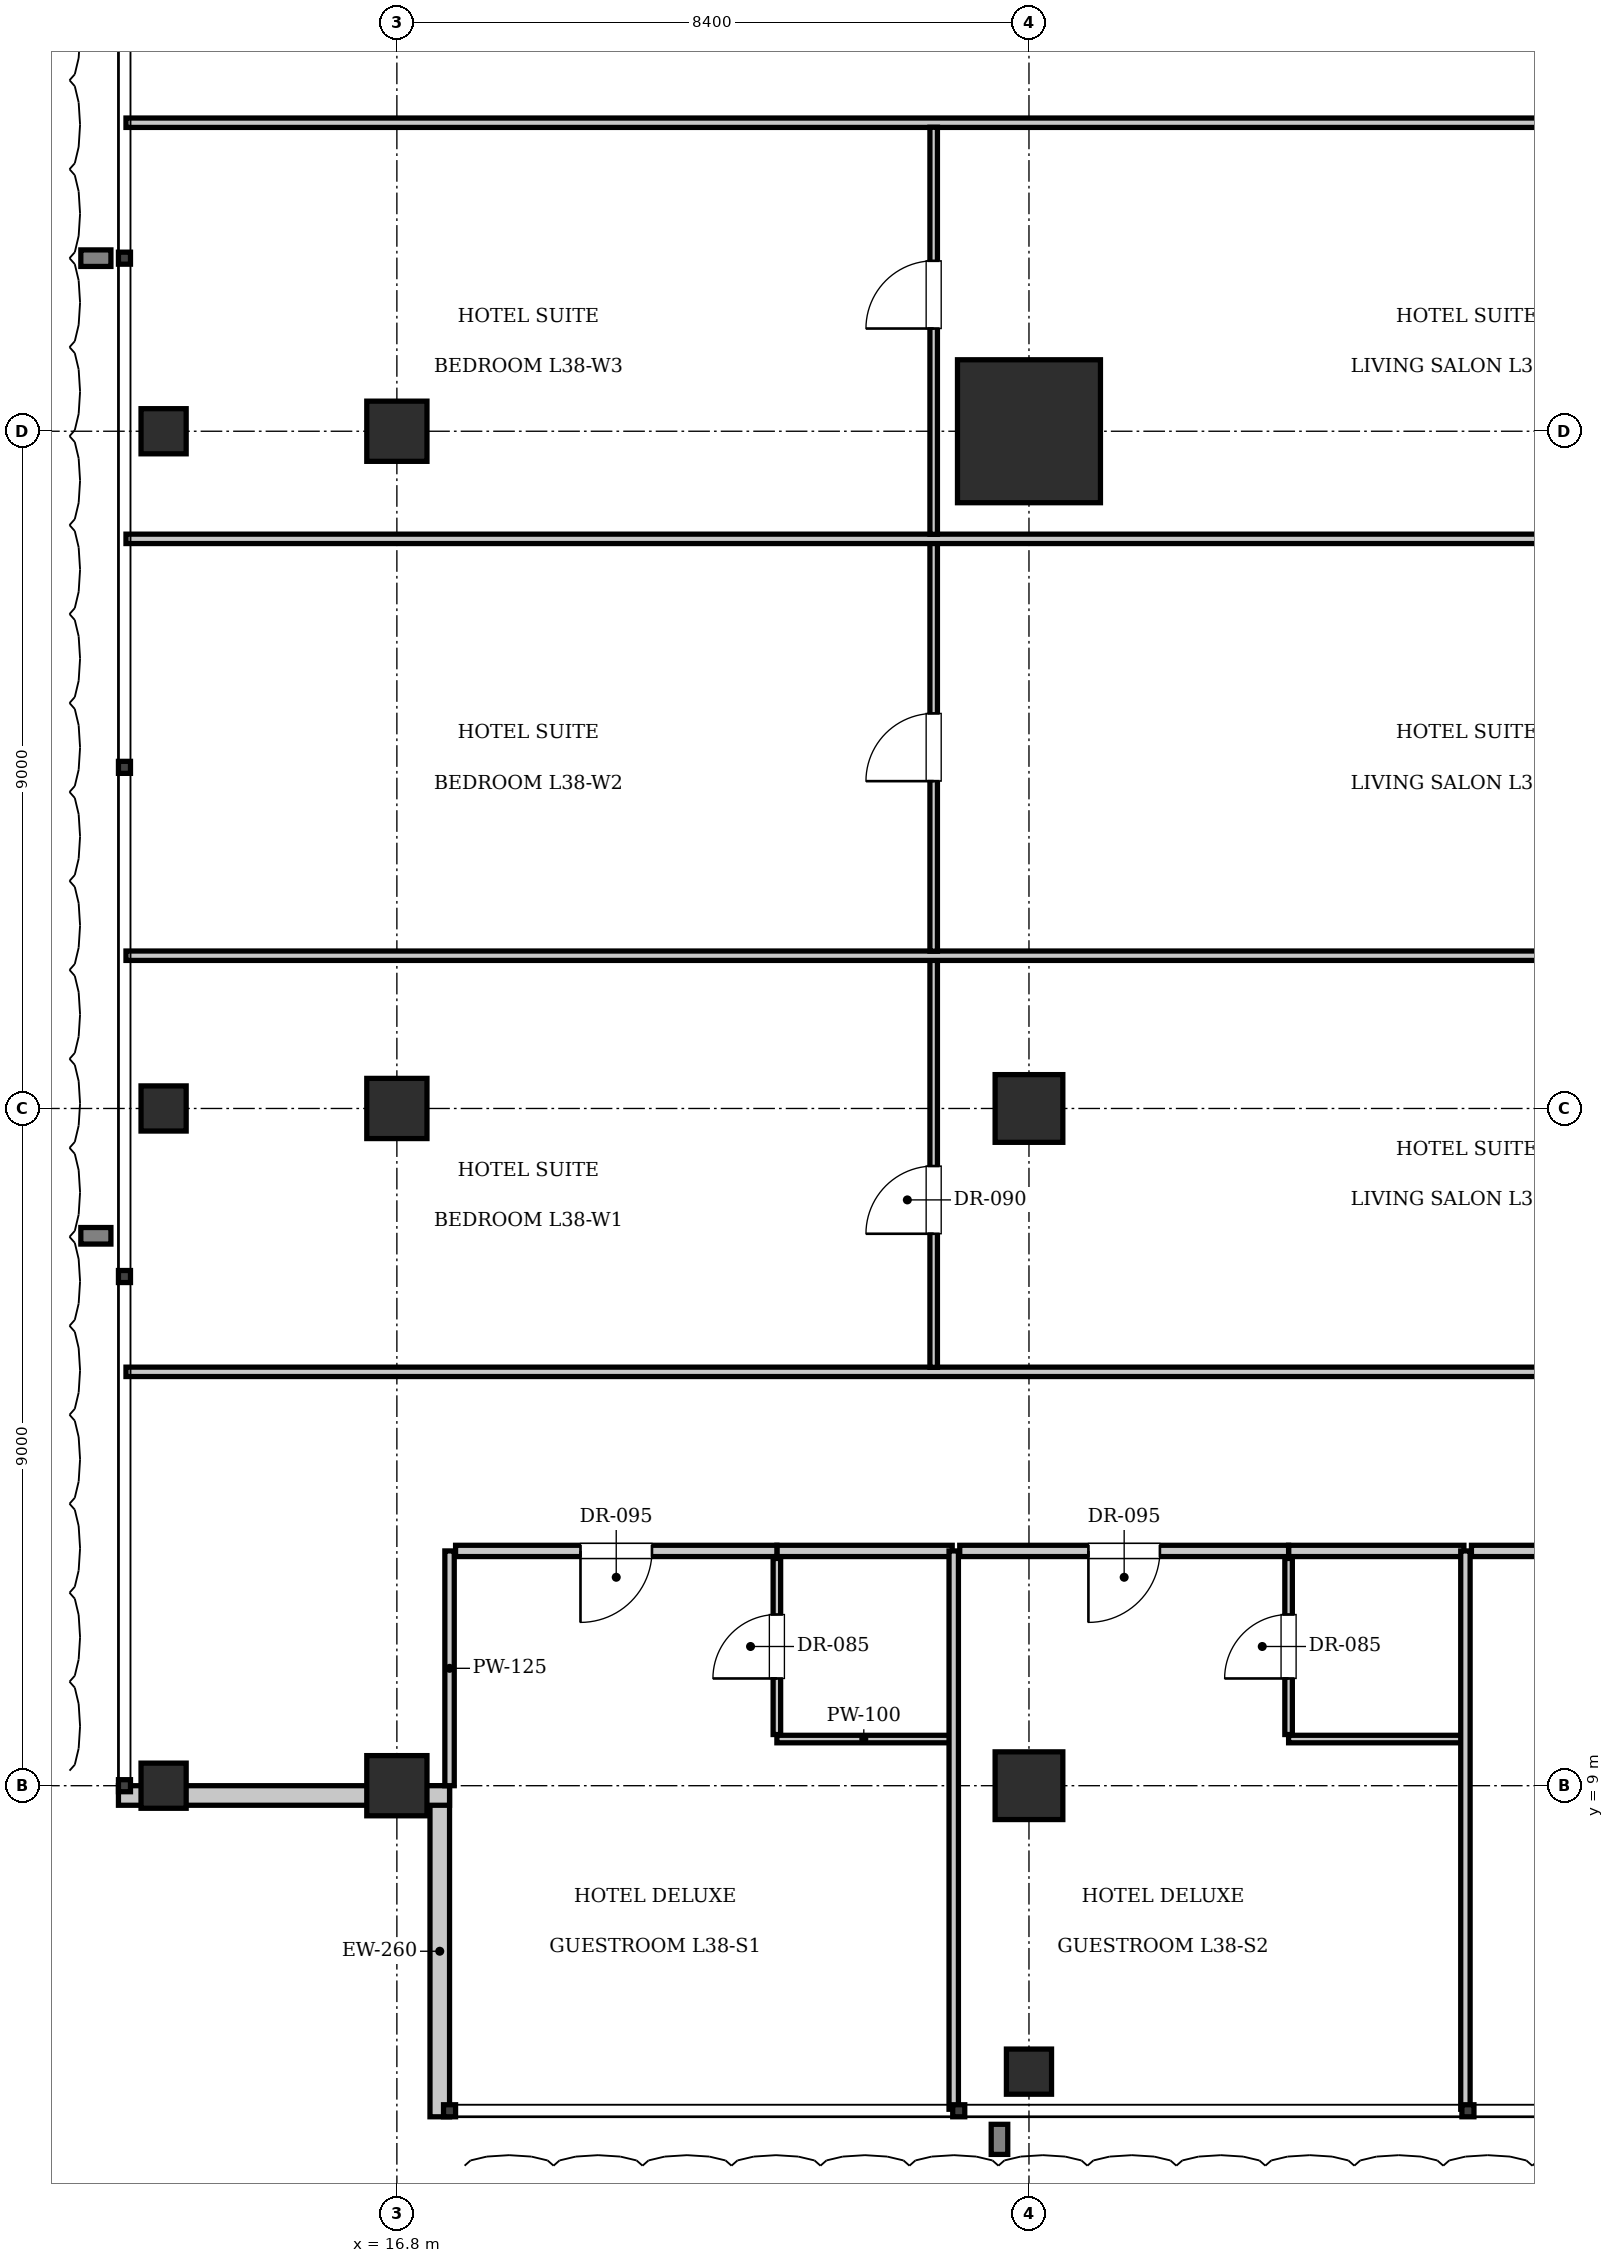
"""IFC4 building model, lengths in metres.
Left out: names, types, materials, properties, quantities, classifications, styles, units other than length and angle.
Written with IfcOpenShell. Run it as: python <this file> out.ifc"""

import sys

from ifc_helpers import new_model, si_unit, direction, frame, frame_2d, origin, origin_2d, place, context, subcontext, project, spatial, rectangle, i_section, extrude, element, fill, save


model = new_model("IFC4")
c1 = context("Model", 3, precision=1e-05, world=origin(), true_north=direction((0.0, 1.0)))
c2 = subcontext(c1, "Body", "Model", "MODEL_VIEW")
j1 = project(units=[si_unit("LENGTHUNIT", "METRE"), si_unit("PLANEANGLEUNIT", "RADIAN")], contexts=[c1])
p1 = place(None, origin())
s1 = spatial("IfcSite", under=j1, at=p1, CompositionType="ELEMENT")
p2 = place(p1, origin())
s2 = spatial("IfcBuilding", under=s1, at=p2, CompositionType="ELEMENT")
p3 = place(p2, frame((0.0, 0.0, 158.2)))
s3 = spatial("IfcBuildingStorey", under=s2, at=p3, CompositionType="ELEMENT", Elevation=158.2)
p4 = place(p3, frame((25.2, 27.0, 0.0), z_axis=(0.0, 0.0, 1.0), x_axis=(1.0, 0.0, 0.0)))
e1 = element("IfcColumn", 1, at=p4, inside=s3, PredefinedType="COLUMN", context=c2, shape_type="SweptSolid", body=[
    extrude(rectangle(XDim=1.9, YDim=1.9, at=origin_2d()), origin(), (0.0, 0.0, 1.0), 3.85),
])
for number, where, z_axis, x_axis in (
    (2, (25.2, 18.0, 0.0), (0.0, 0.0, 1.0), (1.0, 0.0, 0.0)),
    (3, (25.2, 9.0, 0.0), (0.0, 0.0, 1.0), (1.0, 0.0, 0.0)),
):
    element("IfcColumn", number, at=place(p3, frame(where, z_axis=z_axis, x_axis=x_axis)), inside=s3, PredefinedType="COLUMN", context=c2, shape_type="SweptSolid", body=[
        extrude(rectangle(XDim=0.9, YDim=0.9, at=origin_2d()), origin(), (0.0, 0.0, 1.0), 3.85),
    ])
for number, where, z_axis, x_axis in (
    (4, (16.8, 9.0, 0.0), (0.0, 0.0, 1.0), (1.0, 0.0, 0.0)),
    (5, (16.8, 18.0, 0.0), (0.0, 0.0, 1.0), (1.0, 0.0, 0.0)),
    (6, (16.8, 27.0, 0.0), (0.0, 0.0, 1.0), (1.0, 0.0, 0.0)),
):
    element("IfcColumn", number, at=place(p3, frame(where, z_axis=z_axis, x_axis=x_axis)), inside=s3, PredefinedType="COLUMN", context=c2, shape_type="SweptSolid", body=[
        extrude(rectangle(XDim=0.8, YDim=0.8, at=origin_2d()), origin(), (0.0, 0.0, 1.0), 3.85),
    ])
for number, where, z_axis, x_axis in (
    (7, (13.7, 9.0, 0.0), (0.0, 0.0, 1.0), (1.0, 0.0, 0.0)),
    (8, (13.7, 18.0, 0.0), (0.0, 0.0, 1.0), (1.0, 0.0, 0.0)),
    (9, (13.7, 27.0, 0.0), (0.0, 0.0, 1.0), (1.0, 0.0, 0.0)),
    (10, (25.2, 5.2, 0.0), (0.0, 0.0, 1.0), (1.0, 0.0, 0.0)),
):
    element("IfcColumn", number, at=place(p3, frame(where, z_axis=z_axis, x_axis=x_axis)), inside=s3, PredefinedType="COLUMN", context=c2, shape_type="SweptSolid", body=[
        extrude(i_section(OverallWidth=0.6, OverallDepth=0.6, WebThickness=0.025, FlangeThickness=0.038, at=origin_2d()), origin(), (0.0, 0.0, 1.0), 3.85),
    ])
p5 = place(p3, frame((17.37, 4.6, 0.0), z_axis=(0.0, 0.0, 1.0), x_axis=(0.0, 1.0, 0.0)))
e11 = element("IfcWall", 11, at=p5, inside=s3, PredefinedType="SOLIDWALL", context=c2, shape_type="SweptSolid", body=[
    extrude(rectangle(XDim=4.4, YDim=0.26, at=frame_2d((2.2, 0.0))), origin(), (0.0, 0.0, 1.0), 3.61),
])
p6 = place(p3, frame((17.5, 8.87, 0.0), z_axis=(0.0, 0.0, 1.0), x_axis=(-1.0, 0.0, 0.0)))
e12 = element("IfcWall", 12, at=p6, inside=s3, PredefinedType="SOLIDWALL", context=c2, shape_type="SweptSolid", body=[
    extrude(rectangle(XDim=4.4, YDim=0.26, at=frame_2d((2.2, 0.0))), origin(), (0.0, 0.0, 1.0), 3.007),
])
p7 = place(p3, frame((17.5, 9.0, 0.0), z_axis=(0.0, 0.0, 1.0), x_axis=(0.0, 1.0, 0.0)))
e13 = element("IfcWall", 13, at=p7, inside=s3, PredefinedType="PARTITIONING", context=c2, shape_type="SweptSolid", body=[
    extrude(rectangle(XDim=3.12, YDim=0.125, at=frame_2d((1.56, 0.0))), origin(), (0.0, 0.0, 1.0), 3.61),
])
p8 = place(p3, frame((21.85, 12.12, 0.0), z_axis=(0.0, 0.0, 1.0), x_axis=(1.0, 0.0, 0.0)))
e14 = element("IfcWall", 14, at=p8, inside=s3, PredefinedType="PARTITIONING", context=c2, shape_type="SweptSolid", body=[
    extrude(rectangle(XDim=2.33, YDim=0.15, at=frame_2d((1.165, 0.0))), origin(), (0.0, 0.0, 1.0), 3.61),
])
p9 = place(p3, frame((21.85, 9.62, 0.0), z_axis=(0.0, 0.0, 1.0), x_axis=(1.0, 0.0, 0.0)))
e15 = element("IfcWall", 15, at=p9, inside=s3, PredefinedType="PARTITIONING", context=c2, shape_type="SweptSolid", body=[
    extrude(rectangle(XDim=2.31, YDim=0.1, at=frame_2d((1.155, 0.0))), origin(), (0.0, 0.0, 1.0), 3.61),
])
p10 = place(p3, frame((21.85, 9.68, 0.0), z_axis=(0.0, 0.0, 1.0), x_axis=(0.0, 1.0, 0.0)))
e16 = element("IfcWall", 16, at=p10, inside=s3, PredefinedType="PARTITIONING", context=c2, shape_type="SweptSolid", body=[
    extrude(rectangle(XDim=2.34, YDim=0.1, at=frame_2d((1.17, 0.0))), origin(), (0.0, 0.0, 1.0), 3.61),
])
p11 = place(p10, frame((0.745, 0.0, 0.0)))
e17 = element("IfcOpeningElement", 17, at=p11, cuts=e16, PredefinedType="OPENING", context=c2, shape_type="SweptSolid", body=[
    extrude(rectangle(XDim=0.85, YDim=2.1, at=frame_2d((0.425, 1.05))), frame((0.0, 0.06, 0.0), z_axis=(0.0, -1.0, 0.0), x_axis=(1.0, 0.0, 0.0)), (0.0, 0.0, 1.0), 0.12),
])
p12 = place(p3, frame((17.58, 12.12, 0.0), z_axis=(0.0, 0.0, 1.0), x_axis=(1.0, 0.0, 0.0)))
e18 = element("IfcWall", 18, at=p12, inside=s3, PredefinedType="PARTITIONING", context=c2, shape_type="SweptSolid", body=[
    extrude(rectangle(XDim=4.27, YDim=0.15, at=frame_2d((2.135, 0.0))), origin(), (0.0, 0.0, 1.0), 3.61),
])
p13 = place(p12, frame((1.66, 0.0, 0.0)))
e19 = element("IfcOpeningElement", 19, at=p13, cuts=e18, PredefinedType="OPENING", context=c2, shape_type="SweptSolid", body=[
    extrude(rectangle(XDim=0.95, YDim=2.15, at=frame_2d((0.475, 1.075))), frame((0.0, 0.085, 0.0), z_axis=(0.0, -1.0, 0.0), x_axis=(1.0, 0.0, 0.0)), (0.0, 0.0, 1.0), 0.17),
])
p14 = place(p3, frame((24.2, 4.7, 0.0), z_axis=(0.0, 0.0, 1.0), x_axis=(0.0, 1.0, 0.0)))
e20 = element("IfcWall", 20, at=p14, inside=s3, PredefinedType="PARTITIONING", context=c2, shape_type="SweptSolid", body=[
    extrude(rectangle(XDim=7.42, YDim=0.125, at=frame_2d((3.71, 0.0))), origin(), (0.0, 0.0, 1.0), 3.61),
])
p15 = place(p3, frame((28.65, 12.12, 0.0), z_axis=(0.0, 0.0, 1.0), x_axis=(1.0, 0.0, 0.0)))
e21 = element("IfcWall", 21, at=p15, inside=s3, PredefinedType="PARTITIONING", context=c2, shape_type="SweptSolid", body=[
    extrude(rectangle(XDim=2.33, YDim=0.15, at=frame_2d((1.165, 0.0))), origin(), (0.0, 0.0, 1.0), 3.61),
])
p16 = place(p3, frame((28.65, 9.62, 0.0), z_axis=(0.0, 0.0, 1.0), x_axis=(1.0, 0.0, 0.0)))
e22 = element("IfcWall", 22, at=p16, inside=s3, PredefinedType="PARTITIONING", context=c2, shape_type="SweptSolid", body=[
    extrude(rectangle(XDim=2.31, YDim=0.1, at=frame_2d((1.155, 0.0))), origin(), (0.0, 0.0, 1.0), 3.61),
])
p17 = place(p3, frame((28.65, 9.68, 0.0), z_axis=(0.0, 0.0, 1.0), x_axis=(0.0, 1.0, 0.0)))
e23 = element("IfcWall", 23, at=p17, inside=s3, PredefinedType="PARTITIONING", context=c2, shape_type="SweptSolid", body=[
    extrude(rectangle(XDim=2.34, YDim=0.1, at=frame_2d((1.17, 0.0))), origin(), (0.0, 0.0, 1.0), 3.61),
])
p18 = place(p17, frame((0.745, 0.0, 0.0)))
e24 = element("IfcOpeningElement", 24, at=p18, cuts=e23, PredefinedType="OPENING", context=c2, shape_type="SweptSolid", body=[
    extrude(rectangle(XDim=0.85, YDim=2.1, at=frame_2d((0.425, 1.05))), frame((0.0, 0.06, 0.0), z_axis=(0.0, -1.0, 0.0), x_axis=(1.0, 0.0, 0.0)), (0.0, 0.0, 1.0), 0.12),
])
p19 = place(p3, frame((24.28, 12.12, 0.0), z_axis=(0.0, 0.0, 1.0), x_axis=(1.0, 0.0, 0.0)))
e25 = element("IfcWall", 25, at=p19, inside=s3, PredefinedType="PARTITIONING", context=c2, shape_type="SweptSolid", body=[
    extrude(rectangle(XDim=4.37, YDim=0.15, at=frame_2d((2.185, 0.0))), origin(), (0.0, 0.0, 1.0), 3.61),
])
p20 = place(p19, frame((1.71, 0.0, 0.0)))
e26 = element("IfcOpeningElement", 26, at=p20, cuts=e25, PredefinedType="OPENING", context=c2, shape_type="SweptSolid", body=[
    extrude(rectangle(XDim=0.95, YDim=2.15, at=frame_2d((0.475, 1.075))), frame((0.0, 0.085, 0.0), z_axis=(0.0, -1.0, 0.0), x_axis=(1.0, 0.0, 0.0)), (0.0, 0.0, 1.0), 0.17),
])
p21 = place(p3, frame((31.0, 4.7, 0.0), z_axis=(0.0, 0.0, 1.0), x_axis=(0.0, 1.0, 0.0)))
e27 = element("IfcWall", 27, at=p21, inside=s3, PredefinedType="PARTITIONING", context=c2, shape_type="SweptSolid", body=[
    extrude(rectangle(XDim=7.42, YDim=0.125, at=frame_2d((3.71, 0.0))), origin(), (0.0, 0.0, 1.0), 3.61),
])
p22 = place(p3, frame((31.08, 12.12, 0.0), z_axis=(0.0, 0.0, 1.0), x_axis=(1.0, 0.0, 0.0)))
e28 = element("IfcWall", 28, at=p22, inside=s3, PredefinedType="PARTITIONING", context=c2, shape_type="SweptSolid", body=[
    extrude(rectangle(XDim=4.37, YDim=0.15, at=frame_2d((2.185, 0.0))), origin(), (0.0, 0.0, 1.0), 3.61),
])
p23 = place(p22, frame((1.71, 0.0, 0.0)))
e29 = element("IfcOpeningElement", 29, at=p23, cuts=e28, PredefinedType="OPENING", context=c2, shape_type="SweptSolid", body=[
    extrude(rectangle(XDim=0.95, YDim=2.15, at=frame_2d((0.475, 1.075))), frame((0.0, 0.085, 0.0), z_axis=(0.0, -1.0, 0.0), x_axis=(1.0, 0.0, 0.0)), (0.0, 0.0, 1.0), 0.17),
])
for number, where, z_axis, x_axis in (
    (30, (13.2, 14.5, 0.0), (0.0, 0.0, 1.0), (1.0, 0.0, 0.0)),
    (31, (13.2, 31.1, 0.0), (0.0, 0.0, 1.0), (1.0, 0.0, 0.0)),
):
    element("IfcWall", number, at=place(p3, frame(where, z_axis=z_axis, x_axis=x_axis)), inside=s3, PredefinedType="PARTITIONING", context=c2, shape_type="SweptSolid", body=[
        extrude(rectangle(XDim=24.92, YDim=0.125, at=frame_2d((12.46, 0.0))), origin(), (0.0, 0.0, 1.0), 3.61),
    ])
p24 = place(p3, frame((23.934, 14.56, 0.0), z_axis=(0.0, 0.0, 1.0), x_axis=(0.0, 1.0, 0.0)))
e32 = element("IfcWall", 32, at=p24, inside=s3, PredefinedType="PARTITIONING", context=c2, shape_type="SweptSolid", body=[
    extrude(rectangle(XDim=5.41, YDim=0.1, at=frame_2d((2.705, 0.0))), origin(), (0.0, 0.0, 1.0), 3.61),
])
p25 = place(p24, frame((1.775, 0.0, 0.0)))
e33 = element("IfcOpeningElement", 33, at=p25, cuts=e32, PredefinedType="OPENING", context=c2, shape_type="SweptSolid", body=[
    extrude(rectangle(XDim=0.9, YDim=2.1, at=frame_2d((0.45, 1.05))), frame((0.0, 0.06, 0.0), z_axis=(0.0, -1.0, 0.0), x_axis=(1.0, 0.0, 0.0)), (0.0, 0.0, 1.0), 0.12),
])
p26 = place(p3, frame((13.2, 20.03, 0.0), z_axis=(0.0, 0.0, 1.0), x_axis=(1.0, 0.0, 0.0)))
e34 = element("IfcWall", 34, at=p26, inside=s3, PredefinedType="PARTITIONING", context=c2, shape_type="SweptSolid", body=[
    extrude(rectangle(XDim=24.92, YDim=0.125, at=frame_2d((12.46, 0.0))), origin(), (0.0, 0.0, 1.0), 3.61),
])
p27 = place(p3, frame((23.934, 20.09, 0.0), z_axis=(0.0, 0.0, 1.0), x_axis=(0.0, 1.0, 0.0)))
e35 = element("IfcWall", 35, at=p27, inside=s3, PredefinedType="PARTITIONING", context=c2, shape_type="SweptSolid", body=[
    extrude(rectangle(XDim=5.42, YDim=0.1, at=frame_2d((2.71, 0.0))), origin(), (0.0, 0.0, 1.0), 3.61),
])
p28 = place(p27, frame((2.26, 0.0, 0.0)))
e36 = element("IfcOpeningElement", 36, at=p28, cuts=e35, PredefinedType="OPENING", context=c2, shape_type="SweptSolid", body=[
    extrude(rectangle(XDim=0.9, YDim=2.1, at=frame_2d((0.45, 1.05))), frame((0.0, 0.06, 0.0), z_axis=(0.0, -1.0, 0.0), x_axis=(1.0, 0.0, 0.0)), (0.0, 0.0, 1.0), 0.12),
])
p29 = place(p3, frame((13.2, 25.57, 0.0), z_axis=(0.0, 0.0, 1.0), x_axis=(1.0, 0.0, 0.0)))
e37 = element("IfcWall", 37, at=p29, inside=s3, PredefinedType="PARTITIONING", context=c2, shape_type="SweptSolid", body=[
    extrude(rectangle(XDim=24.92, YDim=0.125, at=frame_2d((12.46, 0.0))), origin(), (0.0, 0.0, 1.0), 3.61),
])
p30 = place(p3, frame((23.934, 25.63, 0.0), z_axis=(0.0, 0.0, 1.0), x_axis=(0.0, 1.0, 0.0)))
e38 = element("IfcWall", 38, at=p30, inside=s3, PredefinedType="PARTITIONING", context=c2, shape_type="SweptSolid", body=[
    extrude(rectangle(XDim=5.41, YDim=0.1, at=frame_2d((2.705, 0.0))), origin(), (0.0, 0.0, 1.0), 3.61),
])
p31 = place(p30, frame((2.735, 0.0, 0.0)))
e39 = element("IfcOpeningElement", 39, at=p31, cuts=e38, PredefinedType="OPENING", context=c2, shape_type="SweptSolid", body=[
    extrude(rectangle(XDim=0.9, YDim=2.1, at=frame_2d((0.45, 1.05))), frame((0.0, 0.06, 0.0), z_axis=(0.0, -1.0, 0.0), x_axis=(1.0, 0.0, 0.0)), (0.0, 0.0, 1.0), 0.12),
])
p32 = place(p11, origin())
e40 = element("IfcDoor", 40, at=p32, inside=s3, OperationType="SINGLE_SWING_LEFT", PredefinedType="DOOR", context=c2, shape_type="SweptSolid", body=[
    extrude(rectangle(XDim=0.85, YDim=2.1, at=frame_2d((0.425, 1.05))), frame((0.0, 0.025, 0.0), z_axis=(0.0, -1.0, 0.0), x_axis=(1.0, 0.0, 0.0)), (0.0, 0.0, 1.0), 0.05),
])
fill(e17, e40)
p33 = place(p13, frame((0.95, 0.0, 0.0), z_axis=(0.0, 0.0, 1.0), x_axis=(-1.0, 0.0, 0.0)))
e41 = element("IfcDoor", 41, at=p33, inside=s3, OperationType="SINGLE_SWING_RIGHT", PredefinedType="DOOR", context=c2, shape_type="SweptSolid", body=[
    extrude(rectangle(XDim=0.95, YDim=2.15, at=frame_2d((0.475, 1.075))), frame((0.0, 0.025, 0.0), z_axis=(0.0, -1.0, 0.0), x_axis=(1.0, 0.0, 0.0)), (0.0, 0.0, 1.0), 0.05),
])
fill(e19, e41)
p34 = place(p18, origin())
e42 = element("IfcDoor", 42, at=p34, inside=s3, OperationType="SINGLE_SWING_LEFT", PredefinedType="DOOR", context=c2, shape_type="SweptSolid", body=[
    extrude(rectangle(XDim=0.85, YDim=2.1, at=frame_2d((0.425, 1.05))), frame((0.0, 0.025, 0.0), z_axis=(0.0, -1.0, 0.0), x_axis=(1.0, 0.0, 0.0)), (0.0, 0.0, 1.0), 0.05),
])
fill(e24, e42)
p35 = place(p20, frame((0.95, 0.0, 0.0), z_axis=(0.0, 0.0, 1.0), x_axis=(-1.0, 0.0, 0.0)))
e43 = element("IfcDoor", 43, at=p35, inside=s3, OperationType="SINGLE_SWING_RIGHT", PredefinedType="DOOR", context=c2, shape_type="SweptSolid", body=[
    extrude(rectangle(XDim=0.95, YDim=2.15, at=frame_2d((0.475, 1.075))), frame((0.0, 0.025, 0.0), z_axis=(0.0, -1.0, 0.0), x_axis=(1.0, 0.0, 0.0)), (0.0, 0.0, 1.0), 0.05),
])
fill(e26, e43)
p36 = place(p25, origin())
e44 = element("IfcDoor", 44, at=p36, inside=s3, OperationType="SINGLE_SWING_LEFT", PredefinedType="DOOR", context=c2, shape_type="SweptSolid", body=[
    extrude(rectangle(XDim=0.9, YDim=2.1, at=frame_2d((0.45, 1.05))), frame((0.0, 0.025, 0.0), z_axis=(0.0, -1.0, 0.0), x_axis=(1.0, 0.0, 0.0)), (0.0, 0.0, 1.0), 0.05),
])
fill(e33, e44)
p37 = place(p28, origin())
e45 = element("IfcDoor", 45, at=p37, inside=s3, OperationType="SINGLE_SWING_LEFT", PredefinedType="DOOR", context=c2, shape_type="SweptSolid", body=[
    extrude(rectangle(XDim=0.9, YDim=2.1, at=frame_2d((0.45, 1.05))), frame((0.0, 0.025, 0.0), z_axis=(0.0, -1.0, 0.0), x_axis=(1.0, 0.0, 0.0)), (0.0, 0.0, 1.0), 0.05),
])
fill(e36, e45)
p38 = place(p31, origin())
e46 = element("IfcDoor", 46, at=p38, inside=s3, OperationType="SINGLE_SWING_LEFT", PredefinedType="DOOR", context=c2, shape_type="SweptSolid", body=[
    extrude(rectangle(XDim=0.9, YDim=2.1, at=frame_2d((0.45, 1.05))), frame((0.0, 0.025, 0.0), z_axis=(0.0, -1.0, 0.0), x_axis=(1.0, 0.0, 0.0)), (0.0, 0.0, 1.0), 0.05),
])
fill(e39, e46)
save(model, sys.argv[1])
